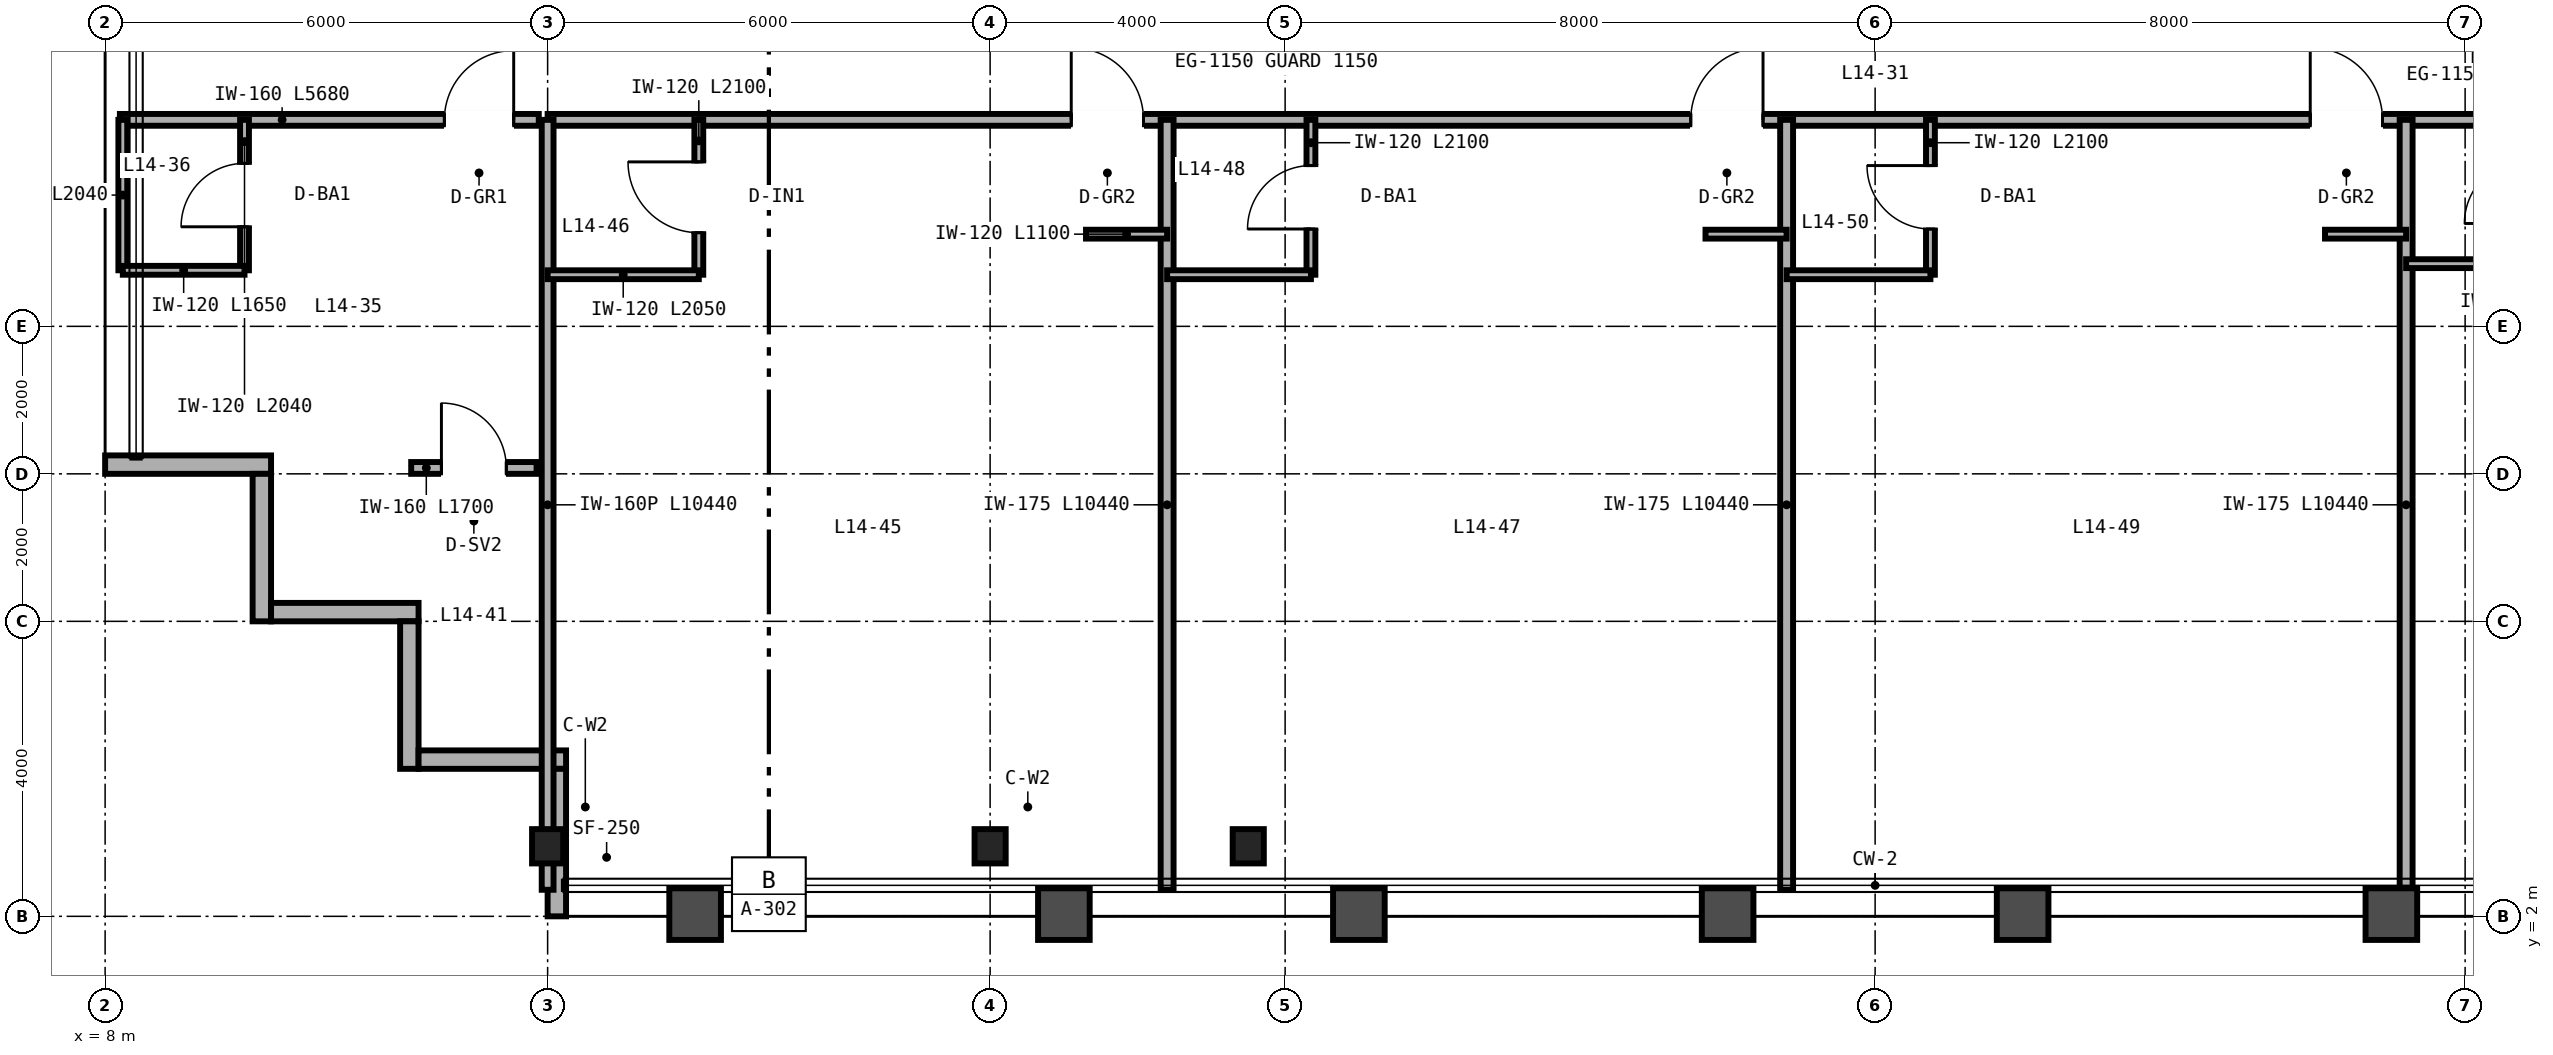
"""IFC4 building model, lengths in metres.
Left out: names, types, materials, properties, quantities, classifications, styles, units other than length and angle.
Written with IfcOpenShell. Run it as: python <this file> out.ifc"""

import sys

from ifc_helpers import new_model, si_unit, direction, frame, frame_2d, origin, origin_2d, place, context, subcontext, project, spatial, rectangle, i_section, extrude, source, transform, mapped, element, fill, save


model = new_model("IFC4")
c1 = context("Model", 3, precision=1e-05, world=origin(), true_north=direction((0.0, 1.0)))
c2 = subcontext(c1, "Body", "Model", "MODEL_VIEW")
j1 = project(units=[si_unit("LENGTHUNIT", "METRE"), si_unit("PLANEANGLEUNIT", "RADIAN")], contexts=[c1])
p1 = place(None, origin())
s1 = spatial("IfcSite", under=j1, at=p1, CompositionType="ELEMENT")
p2 = place(p1, origin())
s2 = spatial("IfcBuilding", under=s1, at=p2, CompositionType="ELEMENT")
p3 = place(p2, frame((0.0, 0.0, 60.0)))
s3 = spatial("IfcBuildingStorey", under=s2, at=p3, CompositionType="ELEMENT", Elevation=60.0)
m1 = source(origin(), c2, "Body", "SweptSolid", [
    extrude(i_section(OverallWidth=0.422, OverallDepth=0.465, WebThickness=0.045, FlangeThickness=0.073, FilletRadius=0.025, at=origin_2d()), origin(), (0.0, 0.0, 1.0), 3.35),
])
for number, where, z_axis, x_axis in (
    (1, (14.0, 2.95, 0.0), (0.0, 0.0, 1.0), (1.0, 0.0, 0.0)),
    (2, (20.0, 2.95, 0.0), (0.0, 0.0, 1.0), (1.0, 0.0, 0.0)),
    (3, (23.5, 2.95, 0.0), (0.0, 0.0, 1.0), (1.0, 0.0, 0.0)),
):
    element("IfcColumn", number, at=place(p3, frame(where, z_axis=z_axis, x_axis=x_axis)), inside=s3, PredefinedType="COLUMN", context=c2, shape_type="MappedRepresentation", body=[
        mapped(m1, transform((0.0, 0.0, 0.0), scale=1.0)),
    ])
p4 = place(p3, frame((8.0, 8.125, 0.0), z_axis=(0.0, 0.0, 1.0), x_axis=(1.0, 0.0, 0.0)))
e4 = element("IfcWall", 4, at=p4, inside=s3, PredefinedType="SOLIDWALL", context=c2, shape_type="SweptSolid", body=[
    extrude(rectangle(XDim=2.25, YDim=0.25, at=frame_2d((1.125, 0.0))), origin(), (0.0, 0.0, 1.0), 3.35),
])
for number, where, z_axis, x_axis in (
    (5, (10.125, 8.0, 0.0), (0.0, 0.0, 1.0), (0.0, -1.0, 0.0)),
    (6, (10.25, 6.125, 0.0), (0.0, 0.0, 1.0), (1.0, 0.0, 0.0)),
    (7, (12.125, 6.0, 0.0), (0.0, 0.0, 1.0), (0.0, -1.0, 0.0)),
    (8, (12.25, 4.125, 0.0), (0.0, 0.0, 1.0), (1.0, 0.0, 0.0)),
):
    element("IfcWall", number, at=place(p3, frame(where, z_axis=z_axis, x_axis=x_axis)), inside=s3, PredefinedType="SOLIDWALL", context=c2, shape_type="SweptSolid", body=[
        extrude(rectangle(XDim=2.0, YDim=0.25, at=frame_2d((1.0, 0.0))), origin(), (0.0, 0.0, 1.0), 3.35),
    ])
p5 = place(p3, frame((14.125, 4.0, 0.0), z_axis=(0.0, 0.0, 1.0), x_axis=(0.0, -1.0, 0.0)))
e9 = element("IfcWall", 9, at=p5, inside=s3, PredefinedType="SOLIDWALL", context=c2, shape_type="SweptSolid", body=[
    extrude(rectangle(XDim=2.0, YDim=0.25, at=frame_2d((1.0, 0.0))), origin(), (0.0, 0.0, 1.0), 2.657),
])
p6 = place(p3, frame((8.2, 12.8, 0.0), z_axis=(0.0, 0.0, 1.0), x_axis=(1.0, 0.0, 0.0)))
e10 = element("IfcWall", 10, at=p6, inside=s3, PredefinedType="PARTITIONING", context=c2, shape_type="SweptSolid", body=[
    extrude(rectangle(XDim=5.68, YDim=0.16, at=frame_2d((2.84, 0.0))), origin(), (0.0, 0.0, 1.0), 3.35),
])
p7 = place(p6, frame((4.4, 0.0, 0.0)))
e11 = element("IfcOpeningElement", 11, at=p7, cuts=e10, PredefinedType="OPENING", context=c2, shape_type="SweptSolid", body=[
    extrude(rectangle(XDim=0.94, YDim=2.15, at=frame_2d((0.47, 1.075))), frame((0.0, 0.09, 0.0), z_axis=(0.0, -1.0, 0.0), x_axis=(1.0, 0.0, 0.0)), (0.0, 0.0, 1.0), 0.18),
])
p8 = place(p3, frame((9.89, 10.76, 0.0), z_axis=(0.0, 0.0, 1.0), x_axis=(0.0, 1.0, 0.0)))
e12 = element("IfcWall", 12, at=p8, inside=s3, PredefinedType="PARTITIONING", context=c2, shape_type="SweptSolid", body=[
    extrude(rectangle(XDim=2.04, YDim=0.12, at=frame_2d((1.02, 0.0))), origin(), (0.0, 0.0, 1.0), 3.35),
])
p9 = place(p8, frame((0.59, 0.0, 0.0)))
e13 = element("IfcOpeningElement", 13, at=p9, cuts=e12, PredefinedType="OPENING", context=c2, shape_type="SweptSolid", body=[
    extrude(rectangle(XDim=0.86, YDim=2.1, at=frame_2d((0.43, 1.05))), frame((0.0, 0.07, 0.0), z_axis=(0.0, -1.0, 0.0), x_axis=(1.0, 0.0, 0.0)), (0.0, 0.0, 1.0), 0.14),
])
p10 = place(p3, frame((8.24, 10.76, 0.0), z_axis=(0.0, 0.0, 1.0), x_axis=(0.0, 1.0, 0.0)))
e14 = element("IfcWall", 14, at=p10, inside=s3, PredefinedType="PARTITIONING", context=c2, shape_type="SweptSolid", body=[
    extrude(rectangle(XDim=2.04, YDim=0.12, at=frame_2d((1.02, 0.0))), origin(), (0.0, 0.0, 1.0), 3.35),
])
p11 = place(p3, frame((8.24, 10.76, 0.0), z_axis=(0.0, 0.0, 1.0), x_axis=(1.0, 0.0, 0.0)))
e15 = element("IfcWall", 15, at=p11, inside=s3, PredefinedType="PARTITIONING", context=c2, shape_type="SweptSolid", body=[
    extrude(rectangle(XDim=1.65, YDim=0.12, at=frame_2d((0.825, 0.0))), origin(), (0.0, 0.0, 1.0), 3.35),
])
p12 = place(p3, frame((12.15, 8.08, 0.0), z_axis=(0.0, 0.0, 1.0), x_axis=(1.0, 0.0, 0.0)))
e16 = element("IfcWall", 16, at=p12, inside=s3, PredefinedType="PARTITIONING", context=c2, shape_type="SweptSolid", body=[
    extrude(rectangle(XDim=1.7, YDim=0.16, at=frame_2d((0.85, 0.0))), origin(), (0.0, 0.0, 1.0), 3.35),
])
p13 = place(p12, frame((0.41, 0.0, 0.0)))
e17 = element("IfcOpeningElement", 17, at=p13, cuts=e16, PredefinedType="OPENING", context=c2, shape_type="SweptSolid", body=[
    extrude(rectangle(XDim=0.88, YDim=2.15, at=frame_2d((0.44, 1.075))), frame((0.0, 0.09, 0.0), z_axis=(0.0, -1.0, 0.0), x_axis=(1.0, 0.0, 0.0)), (0.0, 0.0, 1.0), 0.18),
])
p14 = place(p3, frame((14.0, 12.8, 0.0), z_axis=(0.0, 0.0, 1.0), x_axis=(1.0, 0.0, 0.0)))
e18 = element("IfcWall", 18, at=p14, inside=s3, PredefinedType="PARTITIONING", context=c2, shape_type="SweptSolid", body=[
    extrude(rectangle(XDim=36.0, YDim=0.16, at=frame_2d((18.0, 0.0))), origin(), (0.0, 0.0, 1.0), 2.571),
])
p15 = place(p14, frame((7.1, 0.0, 0.0)))
e19 = element("IfcOpeningElement", 19, at=p15, cuts=e18, PredefinedType="OPENING", context=c2, shape_type="SweptSolid", body=[
    extrude(rectangle(XDim=0.98, YDim=2.2, at=frame_2d((0.49, 1.1))), frame((0.0, 0.09, 0.0), z_axis=(0.0, -1.0, 0.0), x_axis=(1.0, 0.0, 0.0)), (0.0, 0.0, 1.0), 0.18),
])
p16 = place(p14, frame((15.5, 0.0, 0.0)))
e20 = element("IfcOpeningElement", 20, at=p16, cuts=e18, PredefinedType="OPENING", context=c2, shape_type="SweptSolid", body=[
    extrude(rectangle(XDim=0.98, YDim=2.2, at=frame_2d((0.49, 1.1))), frame((0.0, 0.09, 0.0), z_axis=(0.0, -1.0, 0.0), x_axis=(1.0, 0.0, 0.0)), (0.0, 0.0, 1.0), 0.18),
])
p17 = place(p14, frame((23.9, 0.0, 0.0)))
e21 = element("IfcOpeningElement", 21, at=p17, cuts=e18, PredefinedType="OPENING", context=c2, shape_type="SweptSolid", body=[
    extrude(rectangle(XDim=0.98, YDim=2.2, at=frame_2d((0.49, 1.1))), frame((0.0, 0.09, 0.0), z_axis=(0.0, -1.0, 0.0), x_axis=(1.0, 0.0, 0.0)), (0.0, 0.0, 1.0), 0.18),
])
p18 = place(p14, frame((29.34, 0.0, 0.0)))
e22 = element("IfcOpeningElement", 22, at=p18, cuts=e18, PredefinedType="OPENING", context=c2, shape_type="SweptSolid", body=[
    extrude(rectangle(XDim=0.94, YDim=2.15, at=frame_2d((0.47, 1.075))), frame((0.0, 0.09, 0.0), z_axis=(0.0, -1.0, 0.0), x_axis=(1.0, 0.0, 0.0)), (0.0, 0.0, 1.0), 0.18),
])
p19 = place(p14, frame((34.74, 0.0, 0.0)))
e23 = element("IfcOpeningElement", 23, at=p19, cuts=e18, PredefinedType="OPENING", context=c2, shape_type="SweptSolid", body=[
    extrude(rectangle(XDim=0.94, YDim=2.15, at=frame_2d((0.47, 1.075))), frame((0.0, 0.09, 0.0), z_axis=(0.0, -1.0, 0.0), x_axis=(1.0, 0.0, 0.0)), (0.0, 0.0, 1.0), 0.18),
])
p20 = place(p3, frame((14.0, 2.36, 0.0), z_axis=(0.0, 0.0, 1.0), x_axis=(0.0, 1.0, 0.0)))
e24 = element("IfcWall", 24, at=p20, inside=s3, PredefinedType="PARTITIONING", context=c2, shape_type="SweptSolid", body=[
    extrude(rectangle(XDim=10.44, YDim=0.16, at=frame_2d((5.22, 0.0))), origin(), (0.0, 0.0, 1.0), 2.657),
])
p21 = place(p3, frame((22.4, 2.36, 0.0), z_axis=(0.0, 0.0, 1.0), x_axis=(0.0, 1.0, 0.0)))
e25 = element("IfcWall", 25, at=p21, inside=s3, PredefinedType="PARTITIONING", context=c2, shape_type="SweptSolid", body=[
    extrude(rectangle(XDim=10.44, YDim=0.175, at=frame_2d((5.22, 0.0))), origin(), (0.0, 0.0, 1.0), 2.813),
])
p22 = place(p3, frame((16.05, 10.7, 0.0), z_axis=(0.0, 0.0, 1.0), x_axis=(0.0, 1.0, 0.0)))
e26 = element("IfcWall", 26, at=p22, inside=s3, PredefinedType="PARTITIONING", context=c2, shape_type="SweptSolid", body=[
    extrude(rectangle(XDim=2.1, YDim=0.12, at=frame_2d((1.05, 0.0))), origin(), (0.0, 0.0, 1.0), 3.35),
])
p23 = place(p22, frame((0.57, 0.0, 0.0)))
e27 = element("IfcOpeningElement", 27, at=p23, cuts=e26, PredefinedType="OPENING", context=c2, shape_type="SweptSolid", body=[
    extrude(rectangle(XDim=0.96, YDim=2.15, at=frame_2d((0.48, 1.075))), frame((0.0, 0.07, 0.0), z_axis=(0.0, -1.0, 0.0), x_axis=(1.0, 0.0, 0.0)), (0.0, 0.0, 1.0), 0.14),
])
p24 = place(p3, frame((14.0, 10.7, 0.0), z_axis=(0.0, 0.0, 1.0), x_axis=(1.0, 0.0, 0.0)))
e28 = element("IfcWall", 28, at=p24, inside=s3, PredefinedType="PARTITIONING", context=c2, shape_type="SweptSolid", body=[
    extrude(rectangle(XDim=2.05, YDim=0.12, at=frame_2d((1.025, 0.0))), origin(), (0.0, 0.0, 1.0), 3.35),
])
p25 = place(p3, frame((21.3, 11.25, 0.0), z_axis=(0.0, 0.0, 1.0), x_axis=(1.0, 0.0, 0.0)))
e29 = element("IfcWall", 29, at=p25, inside=s3, PredefinedType="PARTITIONING", context=c2, shape_type="SweptSolid", body=[
    extrude(rectangle(XDim=1.1, YDim=0.12, at=frame_2d((0.55, 0.0))), origin(), (0.0, 0.0, 1.0), 3.35),
])
p26 = place(p3, frame((30.8, 2.36, 0.0), z_axis=(0.0, 0.0, 1.0), x_axis=(0.0, 1.0, 0.0)))
e30 = element("IfcWall", 30, at=p26, inside=s3, PredefinedType="PARTITIONING", context=c2, shape_type="SweptSolid", body=[
    extrude(rectangle(XDim=10.44, YDim=0.175, at=frame_2d((5.22, 0.0))), origin(), (0.0, 0.0, 1.0), 2.423),
])
p27 = place(p3, frame((24.35, 10.7, 0.0), z_axis=(0.0, 0.0, 1.0), x_axis=(0.0, 1.0, 0.0)))
e31 = element("IfcWall", 31, at=p27, inside=s3, PredefinedType="PARTITIONING", context=c2, shape_type="SweptSolid", body=[
    extrude(rectangle(XDim=2.1, YDim=0.12, at=frame_2d((1.05, 0.0))), origin(), (0.0, 0.0, 1.0), 3.35),
])
p28 = place(p27, frame((0.62, 0.0, 0.0)))
e32 = element("IfcOpeningElement", 32, at=p28, cuts=e31, PredefinedType="OPENING", context=c2, shape_type="SweptSolid", body=[
    extrude(rectangle(XDim=0.86, YDim=2.1, at=frame_2d((0.43, 1.05))), frame((0.0, 0.07, 0.0), z_axis=(0.0, -1.0, 0.0), x_axis=(1.0, 0.0, 0.0)), (0.0, 0.0, 1.0), 0.14),
])
p29 = place(p3, frame((22.4, 10.7, 0.0), z_axis=(0.0, 0.0, 1.0), x_axis=(1.0, 0.0, 0.0)))
e33 = element("IfcWall", 33, at=p29, inside=s3, PredefinedType="PARTITIONING", context=c2, shape_type="SweptSolid", body=[
    extrude(rectangle(XDim=1.95, YDim=0.12, at=frame_2d((0.975, 0.0))), origin(), (0.0, 0.0, 1.0), 2.571),
])
p30 = place(p3, frame((29.7, 11.25, 0.0), z_axis=(0.0, 0.0, 1.0), x_axis=(1.0, 0.0, 0.0)))
e34 = element("IfcWall", 34, at=p30, inside=s3, PredefinedType="PARTITIONING", context=c2, shape_type="SweptSolid", body=[
    extrude(rectangle(XDim=1.1, YDim=0.12, at=frame_2d((0.55, 0.0))), origin(), (0.0, 0.0, 1.0), 3.35),
])
p31 = place(p3, frame((39.2, 2.36, 0.0), z_axis=(0.0, 0.0, 1.0), x_axis=(0.0, 1.0, 0.0)))
e35 = element("IfcWall", 35, at=p31, inside=s3, PredefinedType="PARTITIONING", context=c2, shape_type="SweptSolid", body=[
    extrude(rectangle(XDim=10.44, YDim=0.175, at=frame_2d((5.22, 0.0))), origin(), (0.0, 0.0, 1.0), 2.423),
])
p32 = place(p3, frame((32.75, 10.7, 0.0), z_axis=(0.0, 0.0, 1.0), x_axis=(0.0, 1.0, 0.0)))
e36 = element("IfcWall", 36, at=p32, inside=s3, PredefinedType="PARTITIONING", context=c2, shape_type="SweptSolid", body=[
    extrude(rectangle(XDim=2.1, YDim=0.12, at=frame_2d((1.05, 0.0))), origin(), (0.0, 0.0, 1.0), 3.35),
])
p33 = place(p32, frame((0.62, 0.0, 0.0)))
e37 = element("IfcOpeningElement", 37, at=p33, cuts=e36, PredefinedType="OPENING", context=c2, shape_type="SweptSolid", body=[
    extrude(rectangle(XDim=0.86, YDim=2.1, at=frame_2d((0.43, 1.05))), frame((0.0, 0.07, 0.0), z_axis=(0.0, -1.0, 0.0), x_axis=(1.0, 0.0, 0.0)), (0.0, 0.0, 1.0), 0.14),
])
p34 = place(p3, frame((30.8, 10.7, 0.0), z_axis=(0.0, 0.0, 1.0), x_axis=(1.0, 0.0, 0.0)))
e38 = element("IfcWall", 38, at=p34, inside=s3, PredefinedType="PARTITIONING", context=c2, shape_type="SweptSolid", body=[
    extrude(rectangle(XDim=1.95, YDim=0.12, at=frame_2d((0.975, 0.0))), origin(), (0.0, 0.0, 1.0), 3.35),
])
p35 = place(p3, frame((38.1, 11.25, 0.0), z_axis=(0.0, 0.0, 1.0), x_axis=(1.0, 0.0, 0.0)))
e39 = element("IfcWall", 39, at=p35, inside=s3, PredefinedType="PARTITIONING", context=c2, shape_type="SweptSolid", body=[
    extrude(rectangle(XDim=1.1, YDim=0.12, at=frame_2d((0.55, 0.0))), origin(), (0.0, 0.0, 1.0), 3.35),
])
p36 = place(p3, frame((39.2, 10.85, 0.0), z_axis=(0.0, 0.0, 1.0), x_axis=(1.0, 0.0, 0.0)))
e40 = element("IfcWall", 40, at=p36, inside=s3, PredefinedType="PARTITIONING", context=c2, shape_type="SweptSolid", body=[
    extrude(rectangle(XDim=1.65, YDim=0.12, at=frame_2d((0.825, 0.0))), origin(), (0.0, 0.0, 1.0), 2.571),
])
m2 = source(origin(), c2, "Body", "SweptSolid", [
    extrude(rectangle(XDim=0.86, YDim=2.1, at=frame_2d((0.43, 1.05))), frame((0.0, 0.025, 0.0), z_axis=(0.0, -1.0, 0.0), x_axis=(1.0, 0.0, 0.0)), (0.0, 0.0, 1.0), 0.05),
])
p37 = place(p9, origin())
e41 = element("IfcDoor", 41, at=p37, inside=s3, OperationType="SINGLE_SWING_LEFT", PredefinedType="DOOR", context=c2, shape_type="MappedRepresentation", body=[
    mapped(m2, transform((0.0, 0.0, 0.0), scale=1.0)),
])
fill(e13, e41)
m3 = source(origin(), c2, "Body", "SweptSolid", [
    extrude(rectangle(XDim=0.94, YDim=2.15, at=frame_2d((0.47, 1.075))), frame((0.0, 0.025, 0.0), z_axis=(0.0, -1.0, 0.0), x_axis=(1.0, 0.0, 0.0)), (0.0, 0.0, 1.0), 0.05),
])
p38 = place(p7, origin())
e42 = element("IfcDoor", 42, at=p38, inside=s3, OperationType="SINGLE_SWING_RIGHT", PredefinedType="DOOR", context=c2, shape_type="MappedRepresentation", body=[
    mapped(m3, transform((0.0, 0.0, 0.0), scale=1.0)),
])
fill(e11, e42)
m4 = source(origin(), c2, "Body", "SweptSolid", [
    extrude(rectangle(XDim=0.88, YDim=2.15, at=frame_2d((0.44, 1.075))), frame((0.0, 0.025, 0.0), z_axis=(0.0, -1.0, 0.0), x_axis=(1.0, 0.0, 0.0)), (0.0, 0.0, 1.0), 0.05),
])
p39 = place(p13, origin())
e43 = element("IfcDoor", 43, at=p39, inside=s3, OperationType="SINGLE_SWING_LEFT", PredefinedType="DOOR", context=c2, shape_type="MappedRepresentation", body=[
    mapped(m4, transform((0.0, 0.0, 0.0), scale=1.0)),
])
fill(e17, e43)
m5 = source(origin(), c2, "Body", "SweptSolid", [
    extrude(rectangle(XDim=0.96, YDim=2.15, at=frame_2d((0.48, 1.075))), frame((0.0, 0.025, 0.0), z_axis=(0.0, -1.0, 0.0), x_axis=(1.0, 0.0, 0.0)), (0.0, 0.0, 1.0), 0.05),
])
p40 = place(p23, origin())
e44 = element("IfcDoor", 44, at=p40, inside=s3, OperationType="SINGLE_SWING_RIGHT", PredefinedType="DOOR", context=c2, shape_type="MappedRepresentation", body=[
    mapped(m5, transform((0.0, 0.0, 0.0), scale=1.0)),
])
fill(e27, e44)
p41 = place(p28, origin())
e45 = element("IfcDoor", 45, at=p41, inside=s3, OperationType="SINGLE_SWING_LEFT", PredefinedType="DOOR", context=c2, shape_type="MappedRepresentation", body=[
    mapped(m2, transform((0.0, 0.0, 0.0), scale=1.0)),
])
fill(e32, e45)
p42 = place(p33, origin())
e46 = element("IfcDoor", 46, at=p42, inside=s3, OperationType="SINGLE_SWING_RIGHT", PredefinedType="DOOR", context=c2, shape_type="MappedRepresentation", body=[
    mapped(m2, transform((0.0, 0.0, 0.0), scale=1.0)),
])
fill(e37, e46)
m6 = source(origin(), c2, "Body", "SweptSolid", [
    extrude(rectangle(XDim=0.98, YDim=2.2, at=frame_2d((0.49, 1.1))), frame((0.0, 0.025, 0.0), z_axis=(0.0, -1.0, 0.0), x_axis=(1.0, 0.0, 0.0)), (0.0, 0.0, 1.0), 0.05),
])
p43 = place(p15, origin())
e47 = element("IfcDoor", 47, at=p43, inside=s3, OperationType="SINGLE_SWING_LEFT", PredefinedType="DOOR", context=c2, shape_type="MappedRepresentation", body=[
    mapped(m6, transform((0.0, 0.0, 0.0), scale=1.0)),
])
fill(e19, e47)
p44 = place(p16, origin())
e48 = element("IfcDoor", 48, at=p44, inside=s3, OperationType="SINGLE_SWING_RIGHT", PredefinedType="DOOR", context=c2, shape_type="MappedRepresentation", body=[
    mapped(m6, transform((0.0, 0.0, 0.0), scale=1.0)),
])
fill(e20, e48)
p45 = place(p17, origin())
e49 = element("IfcDoor", 49, at=p45, inside=s3, OperationType="SINGLE_SWING_LEFT", PredefinedType="DOOR", context=c2, shape_type="MappedRepresentation", body=[
    mapped(m6, transform((0.0, 0.0, 0.0), scale=1.0)),
])
fill(e21, e49)
save(model, sys.argv[1])
